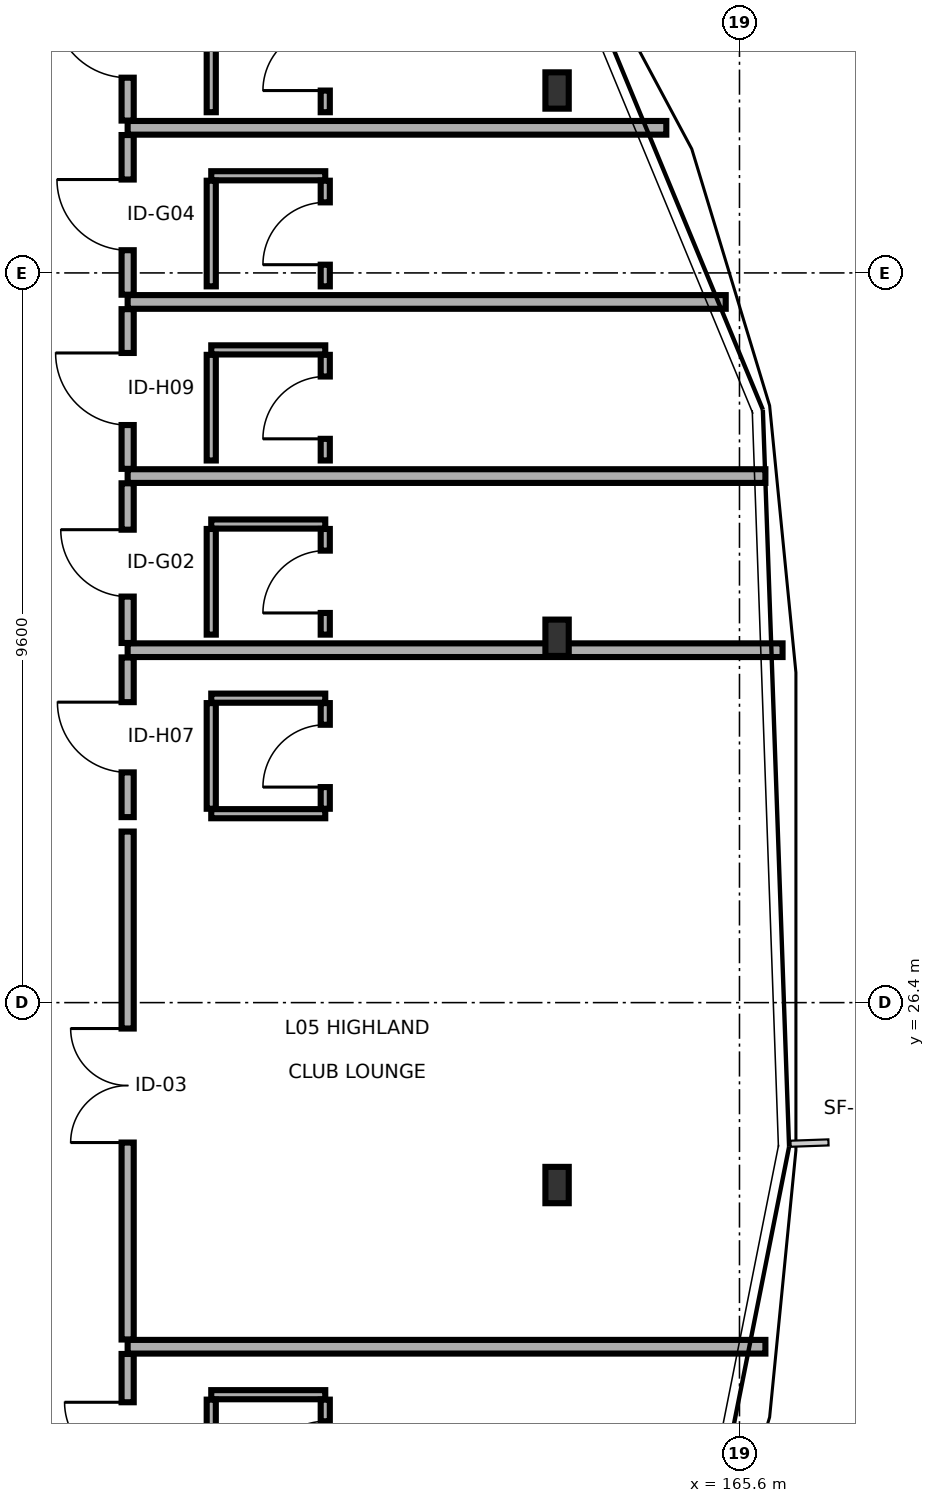
"""IFC4 building model, lengths in metres.
Left out: names, types, materials, properties, quantities, classifications, styles, units other than length and angle.
Written with IfcOpenShell. Run it as: python <this file> out.ifc"""

import sys

from ifc_helpers import new_model, si_unit, direction, frame, frame_2d, origin, origin_2d, place, context, subcontext, project, spatial, rectangle, i_section, extrude, element, fill, save


model = new_model("IFC4")
c1 = context("Model", 3, precision=1e-05, world=origin(), true_north=direction((0.0, 1.0)))
c2 = subcontext(c1, "Body", "Model", "MODEL_VIEW")
j1 = project(units=[si_unit("LENGTHUNIT", "METRE"), si_unit("PLANEANGLEUNIT", "RADIAN")], contexts=[c1])
p1 = place(None, origin())
s1 = spatial("IfcSite", under=j1, at=p1, CompositionType="ELEMENT")
p2 = place(p1, origin())
s2 = spatial("IfcBuilding", under=s1, at=p2, CompositionType="ELEMENT")
p3 = place(p2, frame((0.0, 0.0, 18.1)))
s3 = spatial("IfcBuildingStorey", under=s2, at=p3, CompositionType="ELEMENT", Elevation=18.1)
for number, where, z_axis, x_axis in (
    (1, (163.2, 24.0, 0.0), (0.0, 0.0, 1.0), (1.0, 0.0, 0.0)),
    (2, (163.2, 31.2, 0.0), (0.0, 0.0, 1.0), (1.0, 0.0, 0.0)),
    (3, (163.2, 38.4, 0.0), (0.0, 0.0, 1.0), (1.0, 0.0, 0.0)),
):
    element("IfcColumn", number, at=place(p3, frame(where, z_axis=z_axis, x_axis=x_axis)), inside=s3, PredefinedType="COLUMN", context=c2, shape_type="SweptSolid", body=[
        extrude(i_section(OverallWidth=0.307, OverallDepth=0.478, WebThickness=0.021, FlangeThickness=0.04, FilletRadius=0.027, at=origin_2d()), origin(), (0.0, 0.0, 1.0), 3.4),
    ])
p4 = place(p3, frame((157.55, 21.968, 0.0), z_axis=(0.0, 0.0, 1.0), x_axis=(0.0, 1.0, 0.0)))
e4 = element("IfcWall", 4, at=p4, inside=s3, PredefinedType="PARTITIONING", context=c2, shape_type="SweptSolid", body=[
    extrude(rectangle(XDim=6.683, YDim=0.16, at=frame_2d((3.341, 0.0))), origin(), (0.0, 0.0, 1.0), 2.745),
])
p5 = place(p4, frame((2.591, 0.0, 0.0)))
e5 = element("IfcOpeningElement", 5, at=p5, cuts=e4, PredefinedType="OPENING", context=c2, shape_type="SweptSolid", body=[
    extrude(rectangle(XDim=1.5, YDim=2.25, at=frame_2d((0.75, 1.125))), frame((0.0, 0.09, 0.0), z_axis=(0.0, -1.0, 0.0), x_axis=(1.0, 0.0, 0.0)), (0.0, 0.0, 1.0), 0.18),
])
p6 = place(p3, frame((157.55, 19.677, 0.0), z_axis=(0.0, 0.0, 1.0), x_axis=(0.0, 1.0, 0.0)))
e6 = element("IfcWall", 6, at=p6, inside=s3, PredefinedType="PARTITIONING", context=c2, shape_type="SweptSolid", body=[
    extrude(rectangle(XDim=2.101, YDim=0.16, at=frame_2d((1.05, 0.0))), origin(), (0.0, 0.0, 1.0), 3.21),
])
p7 = place(p6, frame((0.635, 0.0, 0.0)))
e7 = element("IfcOpeningElement", 7, at=p7, cuts=e6, PredefinedType="OPENING", context=c2, shape_type="SweptSolid", body=[
    extrude(rectangle(XDim=0.83, YDim=2.11, at=frame_2d((0.415, 1.055))), frame((0.0, 0.09, 0.0), z_axis=(0.0, -1.0, 0.0), x_axis=(1.0, 0.0, 0.0)), (0.0, 0.0, 1.0), 0.18),
])
p8 = place(p3, frame((158.65, 21.242, 0.0), z_axis=(0.0, 0.0, 1.0), x_axis=(1.0, 0.0, 0.0)))
e8 = element("IfcWall", 8, at=p8, inside=s3, PredefinedType="PARTITIONING", context=c2, shape_type="SweptSolid", body=[
    extrude(rectangle(XDim=1.5, YDim=0.12, at=frame_2d((0.75, 0.0))), origin(), (0.0, 0.0, 1.0), 3.21),
])
p9 = place(p3, frame((158.65, 19.787, 0.0), z_axis=(0.0, 0.0, 1.0), x_axis=(0.0, 1.0, 0.0)))
e9 = element("IfcWall", 9, at=p9, inside=s3, PredefinedType="PARTITIONING", context=c2, shape_type="SweptSolid", body=[
    extrude(rectangle(XDim=1.39, YDim=0.12, at=frame_2d((0.695, 0.0))), origin(), (0.0, 0.0, 1.0), 3.21),
])
p10 = place(p3, frame((160.15, 19.787, 0.0), z_axis=(0.0, 0.0, 1.0), x_axis=(0.0, 1.0, 0.0)))
e10 = element("IfcWall", 10, at=p10, inside=s3, PredefinedType="PARTITIONING", context=c2, shape_type="SweptSolid", body=[
    extrude(rectangle(XDim=1.39, YDim=0.12, at=frame_2d((0.695, 0.0))), origin(), (0.0, 0.0, 1.0), 3.21),
])
p11 = place(p10, frame((0.285, 0.0, 0.0)))
e11 = element("IfcOpeningElement", 11, at=p11, cuts=e10, PredefinedType="OPENING", context=c2, shape_type="SweptSolid", body=[
    extrude(rectangle(XDim=0.82, YDim=2.08, at=frame_2d((0.41, 1.04))), frame((0.0, 0.07, 0.0), z_axis=(0.0, -1.0, 0.0), x_axis=(1.0, 0.0, 0.0)), (0.0, 0.0, 1.0), 0.14),
])
p12 = place(p3, frame((157.55, 21.873, 0.0), z_axis=(0.0, 0.0, 1.0), x_axis=(1.0, 0.0, 0.0)))
e12 = element("IfcWall", 12, at=p12, inside=s3, PredefinedType="PARTITIONING", context=c2, shape_type="SweptSolid", body=[
    extrude(rectangle(XDim=8.391, YDim=0.18, at=frame_2d((4.195, 0.0))), origin(), (0.0, 0.0, 1.0), 2.755),
])
p13 = place(p3, frame((157.55, 28.841, 0.0), z_axis=(0.0, 0.0, 1.0), x_axis=(0.0, 1.0, 0.0)))
e13 = element("IfcWall", 13, at=p13, inside=s3, PredefinedType="PARTITIONING", context=c2, shape_type="SweptSolid", body=[
    extrude(rectangle(XDim=2.101, YDim=0.16, at=frame_2d((1.05, 0.0))), origin(), (0.0, 0.0, 1.0), 3.21),
])
p14 = place(p13, frame((0.588, 0.0, 0.0)))
e14 = element("IfcOpeningElement", 14, at=p14, cuts=e13, PredefinedType="OPENING", context=c2, shape_type="SweptSolid", body=[
    extrude(rectangle(XDim=0.924, YDim=2.16, at=frame_2d((0.462, 1.08))), frame((0.0, 0.09, 0.0), z_axis=(0.0, -1.0, 0.0), x_axis=(1.0, 0.0, 0.0)), (0.0, 0.0, 1.0), 0.18),
])
for number, where, z_axis, x_axis in (
    (15, (158.65, 28.885, 0.0), (0.0, 0.0, 1.0), (1.0, 0.0, 0.0)),
    (16, (158.65, 30.406, 0.0), (0.0, 0.0, 1.0), (1.0, 0.0, 0.0)),
):
    element("IfcWall", number, at=place(p3, frame(where, z_axis=z_axis, x_axis=x_axis)), inside=s3, PredefinedType="PARTITIONING", context=c2, shape_type="SweptSolid", body=[
        extrude(rectangle(XDim=1.5, YDim=0.12, at=frame_2d((0.75, 0.0))), origin(), (0.0, 0.0, 1.0), 3.21),
    ])
p15 = place(p3, frame((158.65, 28.95, 0.0), z_axis=(0.0, 0.0, 1.0), x_axis=(0.0, 1.0, 0.0)))
e17 = element("IfcWall", 17, at=p15, inside=s3, PredefinedType="PARTITIONING", context=c2, shape_type="SweptSolid", body=[
    extrude(rectangle(XDim=1.39, YDim=0.12, at=frame_2d((0.695, 0.0))), origin(), (0.0, 0.0, 1.0), 3.21),
])
p16 = place(p3, frame((160.15, 28.95, 0.0), z_axis=(0.0, 0.0, 1.0), x_axis=(0.0, 1.0, 0.0)))
e18 = element("IfcWall", 18, at=p16, inside=s3, PredefinedType="PARTITIONING", context=c2, shape_type="SweptSolid", body=[
    extrude(rectangle(XDim=1.39, YDim=0.12, at=frame_2d((0.695, 0.0))), origin(), (0.0, 0.0, 1.0), 3.21),
])
p17 = place(p16, frame((0.285, 0.0, 0.0)))
e19 = element("IfcOpeningElement", 19, at=p17, cuts=e18, PredefinedType="OPENING", context=c2, shape_type="SweptSolid", body=[
    extrude(rectangle(XDim=0.82, YDim=2.08, at=frame_2d((0.41, 1.04))), frame((0.0, 0.07, 0.0), z_axis=(0.0, -1.0, 0.0), x_axis=(1.0, 0.0, 0.0)), (0.0, 0.0, 1.0), 0.14),
])
p18 = place(p3, frame((157.55, 31.036, 0.0), z_axis=(0.0, 0.0, 1.0), x_axis=(1.0, 0.0, 0.0)))
e20 = element("IfcWall", 20, at=p18, inside=s3, PredefinedType="PARTITIONING", context=c2, shape_type="SweptSolid", body=[
    extrude(rectangle(XDim=8.617, YDim=0.18, at=frame_2d((4.308, 0.0))), origin(), (0.0, 0.0, 1.0), 2.755),
])
p19 = place(p3, frame((157.55, 31.131, 0.0), z_axis=(0.0, 0.0, 1.0), x_axis=(0.0, 1.0, 0.0)))
e21 = element("IfcWall", 21, at=p19, inside=s3, PredefinedType="PARTITIONING", context=c2, shape_type="SweptSolid", body=[
    extrude(rectangle(XDim=2.101, YDim=0.16, at=frame_2d((1.051, 0.0))), origin(), (0.0, 0.0, 1.0), 2.745),
])
p20 = place(p19, frame((0.611, 0.0, 0.0)))
e22 = element("IfcOpeningElement", 22, at=p20, cuts=e21, PredefinedType="OPENING", context=c2, shape_type="SweptSolid", body=[
    extrude(rectangle(XDim=0.88, YDim=2.05, at=frame_2d((0.44, 1.025))), frame((0.0, 0.09, 0.0), z_axis=(0.0, -1.0, 0.0), x_axis=(1.0, 0.0, 0.0)), (0.0, 0.0, 1.0), 0.18),
])
p21 = place(p3, frame((158.65, 32.696, 0.0), z_axis=(0.0, 0.0, 1.0), x_axis=(1.0, 0.0, 0.0)))
e23 = element("IfcWall", 23, at=p21, inside=s3, PredefinedType="PARTITIONING", context=c2, shape_type="SweptSolid", body=[
    extrude(rectangle(XDim=1.5, YDim=0.12, at=frame_2d((0.75, 0.0))), origin(), (0.0, 0.0, 1.0), 3.21),
])
p22 = place(p3, frame((158.65, 31.241, 0.0), z_axis=(0.0, 0.0, 1.0), x_axis=(0.0, 1.0, 0.0)))
e24 = element("IfcWall", 24, at=p22, inside=s3, PredefinedType="PARTITIONING", context=c2, shape_type="SweptSolid", body=[
    extrude(rectangle(XDim=1.39, YDim=0.12, at=frame_2d((0.695, 0.0))), origin(), (0.0, 0.0, 1.0), 2.745),
])
p23 = place(p3, frame((160.15, 31.241, 0.0), z_axis=(0.0, 0.0, 1.0), x_axis=(0.0, 1.0, 0.0)))
e25 = element("IfcWall", 25, at=p23, inside=s3, PredefinedType="PARTITIONING", context=c2, shape_type="SweptSolid", body=[
    extrude(rectangle(XDim=1.39, YDim=0.12, at=frame_2d((0.695, 0.0))), origin(), (0.0, 0.0, 1.0), 2.745),
])
p24 = place(p23, frame((0.285, 0.0, 0.0)))
e26 = element("IfcOpeningElement", 26, at=p24, cuts=e25, PredefinedType="OPENING", context=c2, shape_type="SweptSolid", body=[
    extrude(rectangle(XDim=0.82, YDim=2.08, at=frame_2d((0.41, 1.04))), frame((0.0, 0.07, 0.0), z_axis=(0.0, -1.0, 0.0), x_axis=(1.0, 0.0, 0.0)), (0.0, 0.0, 1.0), 0.14),
])
p25 = place(p3, frame((157.55, 33.327, 0.0), z_axis=(0.0, 0.0, 1.0), x_axis=(1.0, 0.0, 0.0)))
e27 = element("IfcWall", 27, at=p25, inside=s3, PredefinedType="PARTITIONING", context=c2, shape_type="SweptSolid", body=[
    extrude(rectangle(XDim=8.391, YDim=0.18, at=frame_2d((4.195, 0.0))), origin(), (0.0, 0.0, 1.0), 2.755),
])
p26 = place(p3, frame((157.55, 33.422, 0.0), z_axis=(0.0, 0.0, 1.0), x_axis=(0.0, 1.0, 0.0)))
e28 = element("IfcWall", 28, at=p26, inside=s3, PredefinedType="PARTITIONING", context=c2, shape_type="SweptSolid", body=[
    extrude(rectangle(XDim=2.101, YDim=0.16, at=frame_2d((1.05, 0.0))), origin(), (0.0, 0.0, 1.0), 3.21),
])
p27 = place(p26, frame((0.576, 0.0, 0.0)))
e29 = element("IfcOpeningElement", 29, at=p27, cuts=e28, PredefinedType="OPENING", context=c2, shape_type="SweptSolid", body=[
    extrude(rectangle(XDim=0.948, YDim=2.1, at=frame_2d((0.474, 1.05))), frame((0.0, 0.09, 0.0), z_axis=(0.0, -1.0, 0.0), x_axis=(1.0, 0.0, 0.0)), (0.0, 0.0, 1.0), 0.18),
])
p28 = place(p3, frame((158.65, 34.987, 0.0), z_axis=(0.0, 0.0, 1.0), x_axis=(1.0, 0.0, 0.0)))
e30 = element("IfcWall", 30, at=p28, inside=s3, PredefinedType="PARTITIONING", context=c2, shape_type="SweptSolid", body=[
    extrude(rectangle(XDim=1.5, YDim=0.12, at=frame_2d((0.75, 0.0))), origin(), (0.0, 0.0, 1.0), 3.21),
])
p29 = place(p3, frame((158.65, 33.532, 0.0), z_axis=(0.0, 0.0, 1.0), x_axis=(0.0, 1.0, 0.0)))
e31 = element("IfcWall", 31, at=p29, inside=s3, PredefinedType="PARTITIONING", context=c2, shape_type="SweptSolid", body=[
    extrude(rectangle(XDim=1.39, YDim=0.12, at=frame_2d((0.695, 0.0))), origin(), (0.0, 0.0, 1.0), 3.21),
])
p30 = place(p3, frame((160.15, 33.532, 0.0), z_axis=(0.0, 0.0, 1.0), x_axis=(0.0, 1.0, 0.0)))
e32 = element("IfcWall", 32, at=p30, inside=s3, PredefinedType="PARTITIONING", context=c2, shape_type="SweptSolid", body=[
    extrude(rectangle(XDim=1.39, YDim=0.12, at=frame_2d((0.695, 0.0))), origin(), (0.0, 0.0, 1.0), 3.21),
])
p31 = place(p30, frame((0.285, 0.0, 0.0)))
e33 = element("IfcOpeningElement", 33, at=p31, cuts=e32, PredefinedType="OPENING", context=c2, shape_type="SweptSolid", body=[
    extrude(rectangle(XDim=0.82, YDim=2.08, at=frame_2d((0.41, 1.04))), frame((0.0, 0.07, 0.0), z_axis=(0.0, -1.0, 0.0), x_axis=(1.0, 0.0, 0.0)), (0.0, 0.0, 1.0), 0.14),
])
p32 = place(p3, frame((157.55, 35.618, 0.0), z_axis=(0.0, 0.0, 1.0), x_axis=(1.0, 0.0, 0.0)))
e34 = element("IfcWall", 34, at=p32, inside=s3, PredefinedType="PARTITIONING", context=c2, shape_type="SweptSolid", body=[
    extrude(rectangle(XDim=7.869, YDim=0.18, at=frame_2d((3.934, 0.0))), origin(), (0.0, 0.0, 1.0), 2.755),
])
p33 = place(p3, frame((157.55, 35.713, 0.0), z_axis=(0.0, 0.0, 1.0), x_axis=(0.0, 1.0, 0.0)))
e35 = element("IfcWall", 35, at=p33, inside=s3, PredefinedType="PARTITIONING", context=c2, shape_type="SweptSolid", body=[
    extrude(rectangle(XDim=2.101, YDim=0.16, at=frame_2d((1.051, 0.0))), origin(), (0.0, 0.0, 1.0), 3.21),
])
p34 = place(p33, frame((0.585, 0.0, 0.0)))
e36 = element("IfcOpeningElement", 36, at=p34, cuts=e35, PredefinedType="OPENING", context=c2, shape_type="SweptSolid", body=[
    extrude(rectangle(XDim=0.93, YDim=2.05, at=frame_2d((0.465, 1.025))), frame((0.0, 0.09, 0.0), z_axis=(0.0, -1.0, 0.0), x_axis=(1.0, 0.0, 0.0)), (0.0, 0.0, 1.0), 0.18),
])
p35 = place(p3, frame((158.65, 37.278, 0.0), z_axis=(0.0, 0.0, 1.0), x_axis=(1.0, 0.0, 0.0)))
e37 = element("IfcWall", 37, at=p35, inside=s3, PredefinedType="PARTITIONING", context=c2, shape_type="SweptSolid", body=[
    extrude(rectangle(XDim=1.5, YDim=0.12, at=frame_2d((0.75, 0.0))), origin(), (0.0, 0.0, 1.0), 3.21),
])
p36 = place(p3, frame((158.65, 35.823, 0.0), z_axis=(0.0, 0.0, 1.0), x_axis=(0.0, 1.0, 0.0)))
e38 = element("IfcWall", 38, at=p36, inside=s3, PredefinedType="PARTITIONING", context=c2, shape_type="SweptSolid", body=[
    extrude(rectangle(XDim=1.39, YDim=0.12, at=frame_2d((0.695, 0.0))), origin(), (0.0, 0.0, 1.0), 3.21),
])
p37 = place(p3, frame((160.15, 35.823, 0.0), z_axis=(0.0, 0.0, 1.0), x_axis=(0.0, 1.0, 0.0)))
e39 = element("IfcWall", 39, at=p37, inside=s3, PredefinedType="PARTITIONING", context=c2, shape_type="SweptSolid", body=[
    extrude(rectangle(XDim=1.39, YDim=0.12, at=frame_2d((0.695, 0.0))), origin(), (0.0, 0.0, 1.0), 3.21),
])
p38 = place(p37, frame((0.285, 0.0, 0.0)))
e40 = element("IfcOpeningElement", 40, at=p38, cuts=e39, PredefinedType="OPENING", context=c2, shape_type="SweptSolid", body=[
    extrude(rectangle(XDim=0.82, YDim=2.08, at=frame_2d((0.41, 1.04))), frame((0.0, 0.07, 0.0), z_axis=(0.0, -1.0, 0.0), x_axis=(1.0, 0.0, 0.0)), (0.0, 0.0, 1.0), 0.14),
])
p39 = place(p3, frame((157.55, 37.909, 0.0), z_axis=(0.0, 0.0, 1.0), x_axis=(1.0, 0.0, 0.0)))
e41 = element("IfcWall", 41, at=p39, inside=s3, PredefinedType="PARTITIONING", context=c2, shape_type="SweptSolid", body=[
    extrude(rectangle(XDim=7.087, YDim=0.18, at=frame_2d((3.543, 0.0))), origin(), (0.0, 0.0, 1.0), 2.755),
])
p40 = place(p3, frame((157.55, 38.004, 0.0), z_axis=(0.0, 0.0, 1.0), x_axis=(0.0, 1.0, 0.0)))
e42 = element("IfcWall", 42, at=p40, inside=s3, PredefinedType="PARTITIONING", context=c2, shape_type="SweptSolid", body=[
    extrude(rectangle(XDim=2.101, YDim=0.16, at=frame_2d((1.05, 0.0))), origin(), (0.0, 0.0, 1.0), 2.745),
])
p41 = place(p40, frame((0.564, 0.0, 0.0)))
e43 = element("IfcOpeningElement", 43, at=p41, cuts=e42, PredefinedType="OPENING", context=c2, shape_type="SweptSolid", body=[
    extrude(rectangle(XDim=0.972, YDim=2.16, at=frame_2d((0.486, 1.08))), frame((0.0, 0.09, 0.0), z_axis=(0.0, -1.0, 0.0), x_axis=(1.0, 0.0, 0.0)), (0.0, 0.0, 1.0), 0.18),
])
p42 = place(p3, frame((158.65, 38.114, 0.0), z_axis=(0.0, 0.0, 1.0), x_axis=(0.0, 1.0, 0.0)))
e44 = element("IfcWall", 44, at=p42, inside=s3, PredefinedType="PARTITIONING", context=c2, shape_type="SweptSolid", body=[
    extrude(rectangle(XDim=1.39, YDim=0.12, at=frame_2d((0.695, 0.0))), origin(), (0.0, 0.0, 1.0), 2.745),
])
p43 = place(p3, frame((160.15, 38.114, 0.0), z_axis=(0.0, 0.0, 1.0), x_axis=(0.0, 1.0, 0.0)))
e45 = element("IfcWall", 45, at=p43, inside=s3, PredefinedType="PARTITIONING", context=c2, shape_type="SweptSolid", body=[
    extrude(rectangle(XDim=1.39, YDim=0.12, at=frame_2d((0.695, 0.0))), origin(), (0.0, 0.0, 1.0), 2.745),
])
p44 = place(p43, frame((0.285, 0.0, 0.0)))
e46 = element("IfcOpeningElement", 46, at=p44, cuts=e45, PredefinedType="OPENING", context=c2, shape_type="SweptSolid", body=[
    extrude(rectangle(XDim=0.82, YDim=2.08, at=frame_2d((0.41, 1.04))), frame((0.0, 0.07, 0.0), z_axis=(0.0, -1.0, 0.0), x_axis=(1.0, 0.0, 0.0)), (0.0, 0.0, 1.0), 0.14),
])
p45 = place(p5, origin())
e47 = element("IfcDoor", 47, at=p45, inside=s3, OperationType="DOUBLE_DOOR_SINGLE_SWING", PredefinedType="DOOR", context=c2, shape_type="SweptSolid", body=[
    extrude(rectangle(XDim=1.5, YDim=2.25, at=frame_2d((0.75, 1.125))), frame((0.0, 0.025, 0.0), z_axis=(0.0, -1.0, 0.0), x_axis=(1.0, 0.0, 0.0)), (0.0, 0.0, 1.0), 0.05),
])
fill(e5, e47)
p46 = place(p7, origin())
e48 = element("IfcDoor", 48, at=p46, inside=s3, OperationType="SINGLE_SWING_RIGHT", PredefinedType="DOOR", context=c2, shape_type="SweptSolid", body=[
    extrude(rectangle(XDim=0.83, YDim=2.11, at=frame_2d((0.415, 1.055))), frame((0.0, 0.025, 0.0), z_axis=(0.0, -1.0, 0.0), x_axis=(1.0, 0.0, 0.0)), (0.0, 0.0, 1.0), 0.05),
])
fill(e7, e48)
p47 = place(p11, origin())
e49 = element("IfcDoor", 49, at=p47, inside=s3, OperationType="SINGLE_SWING_LEFT", PredefinedType="DOOR", context=c2, shape_type="SweptSolid", body=[
    extrude(rectangle(XDim=0.82, YDim=2.08, at=frame_2d((0.41, 1.04))), frame((0.0, 0.025, 0.0), z_axis=(0.0, -1.0, 0.0), x_axis=(1.0, 0.0, 0.0)), (0.0, 0.0, 1.0), 0.05),
])
fill(e11, e49)
p48 = place(p14, origin())
e50 = element("IfcDoor", 50, at=p48, inside=s3, OperationType="SINGLE_SWING_RIGHT", PredefinedType="DOOR", context=c2, shape_type="SweptSolid", body=[
    extrude(rectangle(XDim=0.924, YDim=2.16, at=frame_2d((0.462, 1.08))), frame((0.0, 0.025, 0.0), z_axis=(0.0, -1.0, 0.0), x_axis=(1.0, 0.0, 0.0)), (0.0, 0.0, 1.0), 0.05),
])
fill(e14, e50)
p49 = place(p17, origin())
e51 = element("IfcDoor", 51, at=p49, inside=s3, OperationType="SINGLE_SWING_LEFT", PredefinedType="DOOR", context=c2, shape_type="SweptSolid", body=[
    extrude(rectangle(XDim=0.82, YDim=2.08, at=frame_2d((0.41, 1.04))), frame((0.0, 0.025, 0.0), z_axis=(0.0, -1.0, 0.0), x_axis=(1.0, 0.0, 0.0)), (0.0, 0.0, 1.0), 0.05),
])
fill(e19, e51)
p50 = place(p20, origin())
e52 = element("IfcDoor", 52, at=p50, inside=s3, OperationType="SINGLE_SWING_RIGHT", PredefinedType="DOOR", context=c2, shape_type="SweptSolid", body=[
    extrude(rectangle(XDim=0.88, YDim=2.05, at=frame_2d((0.44, 1.025))), frame((0.0, 0.025, 0.0), z_axis=(0.0, -1.0, 0.0), x_axis=(1.0, 0.0, 0.0)), (0.0, 0.0, 1.0), 0.05),
])
fill(e22, e52)
p51 = place(p24, origin())
e53 = element("IfcDoor", 53, at=p51, inside=s3, OperationType="SINGLE_SWING_LEFT", PredefinedType="DOOR", context=c2, shape_type="SweptSolid", body=[
    extrude(rectangle(XDim=0.82, YDim=2.08, at=frame_2d((0.41, 1.04))), frame((0.0, 0.025, 0.0), z_axis=(0.0, -1.0, 0.0), x_axis=(1.0, 0.0, 0.0)), (0.0, 0.0, 1.0), 0.05),
])
fill(e26, e53)
p52 = place(p27, origin())
e54 = element("IfcDoor", 54, at=p52, inside=s3, OperationType="SINGLE_SWING_RIGHT", PredefinedType="DOOR", context=c2, shape_type="SweptSolid", body=[
    extrude(rectangle(XDim=0.948, YDim=2.1, at=frame_2d((0.474, 1.05))), frame((0.0, 0.025, 0.0), z_axis=(0.0, -1.0, 0.0), x_axis=(1.0, 0.0, 0.0)), (0.0, 0.0, 1.0), 0.05),
])
fill(e29, e54)
p53 = place(p31, origin())
e55 = element("IfcDoor", 55, at=p53, inside=s3, OperationType="SINGLE_SWING_LEFT", PredefinedType="DOOR", context=c2, shape_type="SweptSolid", body=[
    extrude(rectangle(XDim=0.82, YDim=2.08, at=frame_2d((0.41, 1.04))), frame((0.0, 0.025, 0.0), z_axis=(0.0, -1.0, 0.0), x_axis=(1.0, 0.0, 0.0)), (0.0, 0.0, 1.0), 0.05),
])
fill(e33, e55)
p54 = place(p34, origin())
e56 = element("IfcDoor", 56, at=p54, inside=s3, OperationType="SINGLE_SWING_RIGHT", PredefinedType="DOOR", context=c2, shape_type="SweptSolid", body=[
    extrude(rectangle(XDim=0.93, YDim=2.05, at=frame_2d((0.465, 1.025))), frame((0.0, 0.025, 0.0), z_axis=(0.0, -1.0, 0.0), x_axis=(1.0, 0.0, 0.0)), (0.0, 0.0, 1.0), 0.05),
])
fill(e36, e56)
p55 = place(p38, origin())
e57 = element("IfcDoor", 57, at=p55, inside=s3, OperationType="SINGLE_SWING_LEFT", PredefinedType="DOOR", context=c2, shape_type="SweptSolid", body=[
    extrude(rectangle(XDim=0.82, YDim=2.08, at=frame_2d((0.41, 1.04))), frame((0.0, 0.025, 0.0), z_axis=(0.0, -1.0, 0.0), x_axis=(1.0, 0.0, 0.0)), (0.0, 0.0, 1.0), 0.05),
])
fill(e40, e57)
p56 = place(p41, origin())
e58 = element("IfcDoor", 58, at=p56, inside=s3, OperationType="SINGLE_SWING_RIGHT", PredefinedType="DOOR", context=c2, shape_type="SweptSolid", body=[
    extrude(rectangle(XDim=0.972, YDim=2.16, at=frame_2d((0.486, 1.08))), frame((0.0, 0.025, 0.0), z_axis=(0.0, -1.0, 0.0), x_axis=(1.0, 0.0, 0.0)), (0.0, 0.0, 1.0), 0.05),
])
fill(e43, e58)
p57 = place(p44, origin())
e59 = element("IfcDoor", 59, at=p57, inside=s3, OperationType="SINGLE_SWING_LEFT", PredefinedType="DOOR", context=c2, shape_type="SweptSolid", body=[
    extrude(rectangle(XDim=0.82, YDim=2.08, at=frame_2d((0.41, 1.04))), frame((0.0, 0.025, 0.0), z_axis=(0.0, -1.0, 0.0), x_axis=(1.0, 0.0, 0.0)), (0.0, 0.0, 1.0), 0.05),
])
fill(e46, e59)
save(model, sys.argv[1])
